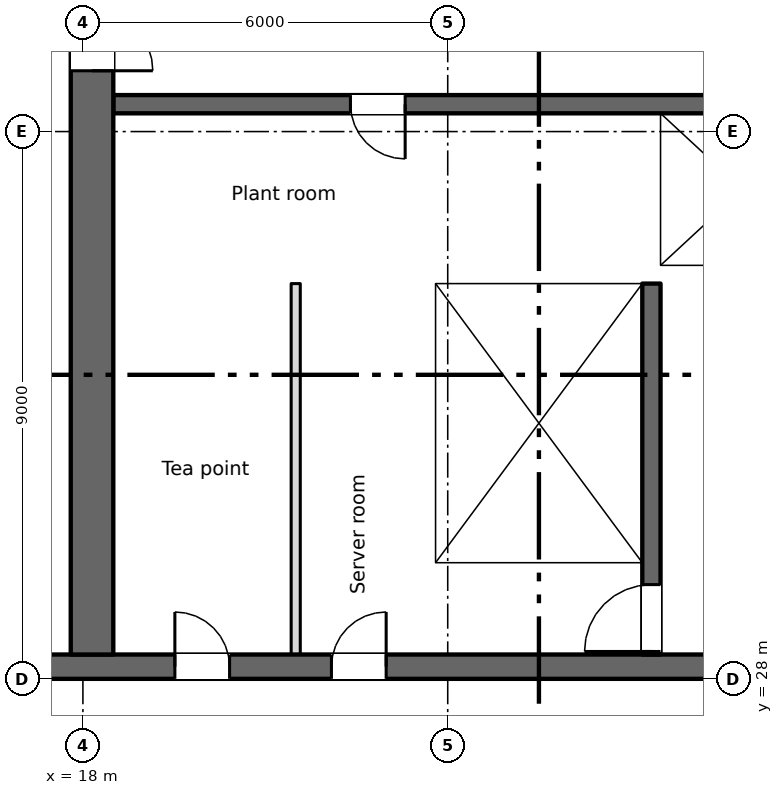
"""IFC4 building model, lengths in metres.
Left out: names, types, materials, properties, quantities, classifications, styles, units other than length and angle.
Written with IfcOpenShell. Run it as: python <this file> out.ifc"""

import sys

from ifc_helpers import new_model, si_unit, direction, frame, frame_2d, origin, place, context, subcontext, project, spatial, rectangle, extrude, element, fill, save


model = new_model("IFC4")
c1 = context("Model", 3, precision=1e-05, world=origin(), true_north=direction((0.0, 1.0)))
c2 = subcontext(c1, "Body", "Model", "MODEL_VIEW")
j1 = project(units=[si_unit("LENGTHUNIT", "METRE"), si_unit("PLANEANGLEUNIT", "RADIAN")], contexts=[c1])
p1 = place(None, origin())
s1 = spatial("IfcSite", under=j1, at=p1, CompositionType="ELEMENT")
p2 = place(p1, origin())
s2 = spatial("IfcBuilding", under=s1, at=p2, CompositionType="ELEMENT")
p3 = place(p2, frame((0.0, 0.0, 189.25)))
s3 = spatial("IfcBuildingStorey", under=s2, at=p3, CompositionType="ELEMENT", Elevation=189.25)
p4 = place(p3, frame((6.6, 28.2, 0.0), z_axis=(0.0, 0.0, 1.0), x_axis=(1.0, 0.0, 0.0)))
e1 = element("IfcWall", 1, at=p4, inside=s3, PredefinedType="SHEAR", context=c2, shape_type="SweptSolid", body=[
    extrude(rectangle(XDim=57.9, YDim=0.4, at=frame_2d((28.95, 0.0))), origin(), (0.0, 0.0, 1.0), 3.35),
])
p5 = place(p4, frame((12.913, 0.0, 0.0)))
e2 = element("IfcOpeningElement", 2, at=p5, cuts=e1, PredefinedType="OPENING", context=c2, shape_type="SweptSolid", body=[
    extrude(rectangle(XDim=0.9, YDim=2.1, at=frame_2d((0.45, 1.05))), frame((0.0, 0.21, 0.0), z_axis=(0.0, -1.0, 0.0), x_axis=(1.0, 0.0, 0.0)), (0.0, 0.0, 1.0), 0.42),
])
p6 = place(p4, frame((15.488, 0.0, 0.0)))
e3 = element("IfcOpeningElement", 3, at=p6, cuts=e1, PredefinedType="OPENING", context=c2, shape_type="SweptSolid", body=[
    extrude(rectangle(XDim=0.9, YDim=2.1, at=frame_2d((0.45, 1.05))), frame((0.0, 0.21, 0.0), z_axis=(0.0, -1.0, 0.0), x_axis=(1.0, 0.0, 0.0)), (0.0, 0.0, 1.0), 0.42),
])
p7 = place(p4, frame((48.413, 0.0, 0.0)))
e4 = element("IfcOpeningElement", 4, at=p7, cuts=e1, PredefinedType="OPENING", context=c2, shape_type="SweptSolid", body=[
    extrude(rectangle(XDim=0.9, YDim=2.1, at=frame_2d((0.45, 1.05))), frame((0.0, 0.21, 0.0), z_axis=(0.0, -1.0, 0.0), x_axis=(1.0, 0.0, 0.0)), (0.0, 0.0, 1.0), 0.42),
])
p8 = place(p4, frame((50.988, 0.0, 0.0)))
e5 = element("IfcOpeningElement", 5, at=p8, cuts=e1, PredefinedType="OPENING", context=c2, shape_type="SweptSolid", body=[
    extrude(rectangle(XDim=0.9, YDim=2.1, at=frame_2d((0.45, 1.05))), frame((0.0, 0.21, 0.0), z_axis=(0.0, -1.0, 0.0), x_axis=(1.0, 0.0, 0.0)), (0.0, 0.0, 1.0), 0.42),
])
p9 = place(p4, frame((0.663, 0.0, 0.0)))
e6 = element("IfcOpeningElement", 6, at=p9, cuts=e1, PredefinedType="OPENING", context=c2, shape_type="SweptSolid", body=[
    extrude(rectangle(XDim=0.9, YDim=2.1, at=frame_2d((0.45, 1.05))), frame((0.0, 0.21, 0.0), z_axis=(0.0, -1.0, 0.0), x_axis=(1.0, 0.0, 0.0)), (0.0, 0.0, 1.0), 0.42),
])
p10 = place(p4, frame((2.238, 0.0, 0.0)))
e7 = element("IfcOpeningElement", 7, at=p10, cuts=e1, PredefinedType="OPENING", context=c2, shape_type="SweptSolid", body=[
    extrude(rectangle(XDim=0.9, YDim=2.1, at=frame_2d((0.45, 1.05))), frame((0.0, 0.21, 0.0), z_axis=(0.0, -1.0, 0.0), x_axis=(1.0, 0.0, 0.0)), (0.0, 0.0, 1.0), 0.42),
])
p11 = place(p4, frame((4.8, 0.0, 0.0)))
e8 = element("IfcOpeningElement", 8, at=p11, cuts=e1, PredefinedType="OPENING", context=c2, shape_type="SweptSolid", body=[
    extrude(rectangle(XDim=1.2, YDim=2.1, at=frame_2d((0.6, 1.05))), frame((0.0, 0.21, 0.0), z_axis=(0.0, -1.0, 0.0), x_axis=(1.0, 0.0, 0.0)), (0.0, 0.0, 1.0), 0.42),
])
p12 = place(p4, frame((31.8, 0.0, 0.0)))
e9 = element("IfcOpeningElement", 9, at=p12, cuts=e1, PredefinedType="OPENING", context=c2, shape_type="SweptSolid", body=[
    extrude(rectangle(XDim=1.2, YDim=2.1, at=frame_2d((0.6, 1.05))), frame((0.0, 0.21, 0.0), z_axis=(0.0, -1.0, 0.0), x_axis=(1.0, 0.0, 0.0)), (0.0, 0.0, 1.0), 0.42),
])
p13 = place(p4, frame((55.3, 0.0, 0.0)))
e10 = element("IfcOpeningElement", 10, at=p13, cuts=e1, PredefinedType="OPENING", context=c2, shape_type="SweptSolid", body=[
    extrude(rectangle(XDim=1.2, YDim=2.1, at=frame_2d((0.6, 1.05))), frame((0.0, 0.21, 0.0), z_axis=(0.0, -1.0, 0.0), x_axis=(1.0, 0.0, 0.0)), (0.0, 0.0, 1.0), 0.42),
])
p14 = place(p4, frame((21.8, 0.0, 0.0)))
e11 = element("IfcOpeningElement", 11, at=p14, cuts=e1, PredefinedType="OPENING", context=c2, shape_type="SweptSolid", body=[
    extrude(rectangle(XDim=1.2, YDim=2.1, at=frame_2d((0.6, 1.05))), frame((0.0, 0.21, 0.0), z_axis=(0.0, -1.0, 0.0), x_axis=(1.0, 0.0, 0.0)), (0.0, 0.0, 1.0), 0.42),
])
p15 = place(p4, frame((41.8, 0.0, 0.0)))
e12 = element("IfcOpeningElement", 12, at=p15, cuts=e1, PredefinedType="OPENING", context=c2, shape_type="SweptSolid", body=[
    extrude(rectangle(XDim=1.2, YDim=2.1, at=frame_2d((0.6, 1.05))), frame((0.0, 0.21, 0.0), z_axis=(0.0, -1.0, 0.0), x_axis=(1.0, 0.0, 0.0)), (0.0, 0.0, 1.0), 0.42),
])
p16 = place(p4, frame((24.95, 0.0, 0.0)))
e13 = element("IfcOpeningElement", 13, at=p16, cuts=e1, PredefinedType="OPENING", context=c2, shape_type="SweptSolid", body=[
    extrude(rectangle(XDim=2.4, YDim=2.1, at=frame_2d((1.2, 1.05))), frame((0.0, 0.21, 0.0), z_axis=(0.0, -1.0, 0.0), x_axis=(1.0, 0.0, 0.0)), (0.0, 0.0, 1.0), 0.42),
])
p17 = place(p4, frame((37.45, 0.0, 0.0)))
e14 = element("IfcOpeningElement", 14, at=p17, cuts=e1, PredefinedType="OPENING", context=c2, shape_type="SweptSolid", body=[
    extrude(rectangle(XDim=2.4, YDim=2.1, at=frame_2d((1.2, 1.05))), frame((0.0, 0.21, 0.0), z_axis=(0.0, -1.0, 0.0), x_axis=(1.0, 0.0, 0.0)), (0.0, 0.0, 1.0), 0.42),
])
p18 = place(p4, frame((8.1, 0.0, 0.0)))
e15 = element("IfcOpeningElement", 15, at=p18, cuts=e1, PredefinedType="OPENING", context=c2, shape_type="SweptSolid", body=[
    extrude(rectangle(XDim=2.4, YDim=2.1, at=frame_2d((1.2, 1.05))), frame((0.0, 0.21, 0.0), z_axis=(0.0, -1.0, 0.0), x_axis=(1.0, 0.0, 0.0)), (0.0, 0.0, 1.0), 0.42),
])
p19 = place(p4, frame((28.95, 0.0, 0.0)))
e16 = element("IfcOpeningElement", 16, at=p19, cuts=e1, PredefinedType="OPENING", context=c2, shape_type="SweptSolid", body=[
    extrude(rectangle(XDim=0.9, YDim=2.1, at=frame_2d((0.45, 1.05))), frame((0.0, 0.21, 0.0), z_axis=(0.0, -1.0, 0.0), x_axis=(1.0, 0.0, 0.0)), (0.0, 0.0, 1.0), 0.42),
])
p20 = place(p4, frame((34.95, 0.0, 0.0)))
e17 = element("IfcOpeningElement", 17, at=p20, cuts=e1, PredefinedType="OPENING", context=c2, shape_type="SweptSolid", body=[
    extrude(rectangle(XDim=0.9, YDim=2.1, at=frame_2d((0.45, 1.05))), frame((0.0, 0.21, 0.0), z_axis=(0.0, -1.0, 0.0), x_axis=(1.0, 0.0, 0.0)), (0.0, 0.0, 1.0), 0.42),
])
p21 = place(p3, frame((18.15, 28.4, 0.0), z_axis=(0.0, 0.0, 1.0), x_axis=(0.0, 1.0, 0.0)))
e18 = element("IfcWall", 18, at=p21, inside=s3, PredefinedType="SHEAR", context=c2, shape_type="SweptSolid", body=[
    extrude(rectangle(XDim=16.9, YDim=0.7, at=frame_2d((8.45, 0.0))), origin(), (0.0, 0.0, 1.0), 3.35),
])
p22 = place(p21, frame((9.6, 0.0, 0.0)))
e19 = element("IfcOpeningElement", 19, at=p22, cuts=e18, PredefinedType="OPENING", context=c2, shape_type="SweptSolid", body=[
    extrude(rectangle(XDim=2.0, YDim=2.1, at=frame_2d((1.0, 1.05))), frame((0.0, 0.36, 0.0), z_axis=(0.0, -1.0, 0.0), x_axis=(1.0, 0.0, 0.0)), (0.0, 0.0, 1.0), 0.72),
])
p23 = place(p21, frame((15.4, 0.0, 0.0)))
e20 = element("IfcOpeningElement", 20, at=p23, cuts=e18, PredefinedType="OPENING", context=c2, shape_type="SweptSolid", body=[
    extrude(rectangle(XDim=1.2, YDim=2.1, at=frame_2d((0.6, 1.05))), frame((0.0, 0.36, 0.0), z_axis=(0.0, -1.0, 0.0), x_axis=(1.0, 0.0, 0.0)), (0.0, 0.0, 1.0), 0.72),
])
p24 = place(p3, frame((23.65, 28.4, 0.0), z_axis=(0.0, 0.0, 1.0), x_axis=(0.0, 1.0, 0.0)))
e21 = element("IfcWall", 21, at=p24, inside=s3, PredefinedType="SHEAR", context=c2, shape_type="SweptSolid", body=[
    extrude(rectangle(XDim=6.1, YDim=0.3, at=frame_2d((3.05, 0.0))), origin(), (0.0, 0.0, 1.0), 3.35),
])
p25 = place(p3, frame((27.35, 28.4, 0.0), z_axis=(0.0, 0.0, 1.0), x_axis=(0.0, 1.0, 0.0)))
e22 = element("IfcWall", 22, at=p25, inside=s3, PredefinedType="SHEAR", context=c2, shape_type="SweptSolid", body=[
    extrude(rectangle(XDim=6.1, YDim=0.3, at=frame_2d((3.05, 0.0))), origin(), (0.0, 0.0, 1.0), 3.35),
])
p26 = place(p25, frame((0.05, 0.0, 0.0)))
e23 = element("IfcOpeningElement", 23, at=p26, cuts=e22, PredefinedType="OPENING", context=c2, shape_type="SweptSolid", body=[
    extrude(rectangle(XDim=1.1, YDim=2.1, at=frame_2d((0.55, 1.05))), frame((0.0, 0.16, 0.0), z_axis=(0.0, -1.0, 0.0), x_axis=(1.0, 0.0, 0.0)), (0.0, 0.0, 1.0), 0.32),
])
p27 = place(p3, frame((18.5, 34.65, 0.0), z_axis=(0.0, 0.0, 1.0), x_axis=(1.0, 0.0, 0.0)))
e24 = element("IfcWall", 24, at=p27, inside=s3, PredefinedType="SHEAR", context=c2, shape_type="SweptSolid", body=[
    extrude(rectangle(XDim=12.2, YDim=0.3, at=frame_2d((6.1, 0.0))), origin(), (0.0, 0.0, 1.0), 3.35),
])
p28 = place(p27, frame((9.8, 0.0, 0.0)))
e25 = element("IfcOpeningElement", 25, at=p28, cuts=e24, PredefinedType="OPENING", context=c2, shape_type="SweptSolid", body=[
    extrude(rectangle(XDim=1.1, YDim=2.1, at=frame_2d((0.55, 1.05))), frame((0.0, 0.16, 0.0), z_axis=(0.0, -1.0, 0.0), x_axis=(1.0, 0.0, 0.0)), (0.0, 0.0, 1.0), 0.32),
])
p29 = place(p3, frame((30.7, 37.45, 0.0), z_axis=(0.0, 0.0, 1.0), x_axis=(-1.0, 0.0, 0.0)))
e26 = element("IfcWall", 26, at=p29, inside=s3, PredefinedType="SHEAR", context=c2, shape_type="SweptSolid", body=[
    extrude(rectangle(XDim=12.2, YDim=0.3, at=frame_2d((6.1, 0.0))), origin(), (0.0, 0.0, 1.0), 3.35),
])
p30 = place(p29, frame((7.4, 0.0, 0.0)))
e27 = element("IfcOpeningElement", 27, at=p30, cuts=e26, PredefinedType="OPENING", context=c2, shape_type="SweptSolid", body=[
    extrude(rectangle(XDim=0.9, YDim=2.1, at=frame_2d((0.45, 1.05))), frame((0.0, 0.16, 0.0), z_axis=(0.0, -1.0, 0.0), x_axis=(1.0, 0.0, 0.0)), (0.0, 0.0, 1.0), 0.32),
])
p31 = place(p3, frame((27.35, 34.8, 0.0), z_axis=(0.0, 0.0, 1.0), x_axis=(0.0, 1.0, 0.0)))
e28 = element("IfcWall", 28, at=p31, inside=s3, PredefinedType="SHEAR", context=c2, shape_type="SweptSolid", body=[
    extrude(rectangle(XDim=2.5, YDim=0.3, at=frame_2d((1.25, 0.0))), origin(), (0.0, 0.0, 1.0), 3.35),
])
p32 = place(p3, frame((21.5, 28.4, 0.0), z_axis=(0.0, 0.0, 1.0), x_axis=(0.0, 1.0, 0.0)))
e29 = element("IfcWall", 29, at=p32, inside=s3, PredefinedType="PARTITIONING", context=c2, shape_type="SweptSolid", body=[
    extrude(rectangle(XDim=6.1, YDim=0.15, at=frame_2d((3.05, 0.0))), origin(), (0.0, 0.0, 1.0), 3.35),
])
p33 = place(p5, origin())
e30 = element("IfcDoor", 30, at=p33, inside=s3, OperationType="SINGLE_SWING_LEFT", PredefinedType="DOOR", context=c2, shape_type="SweptSolid", body=[
    extrude(rectangle(XDim=0.9, YDim=2.1, at=frame_2d((0.45, 1.05))), frame((0.0, 0.025, 0.0), z_axis=(0.0, -1.0, 0.0), x_axis=(1.0, 0.0, 0.0)), (0.0, 0.0, 1.0), 0.05),
])
fill(e2, e30)
p34 = place(p6, origin())
e31 = element("IfcDoor", 31, at=p34, inside=s3, OperationType="SINGLE_SWING_RIGHT", PredefinedType="DOOR", context=c2, shape_type="SweptSolid", body=[
    extrude(rectangle(XDim=0.9, YDim=2.1, at=frame_2d((0.45, 1.05))), frame((0.0, 0.025, 0.0), z_axis=(0.0, -1.0, 0.0), x_axis=(1.0, 0.0, 0.0)), (0.0, 0.0, 1.0), 0.05),
])
fill(e3, e31)
p35 = place(p30, origin())
e32 = element("IfcDoor", 32, at=p35, inside=s3, OperationType="SINGLE_SWING_LEFT", PredefinedType="DOOR", context=c2, shape_type="SweptSolid", body=[
    extrude(rectangle(XDim=0.9, YDim=2.1, at=frame_2d((0.45, 1.05))), frame((0.0, 0.025, 0.0), z_axis=(0.0, -1.0, 0.0), x_axis=(1.0, 0.0, 0.0)), (0.0, 0.0, 1.0), 0.05),
])
fill(e27, e32)
p36 = place(p26, origin())
e33 = element("IfcDoor", 33, at=p36, inside=s3, OperationType="SINGLE_SWING_LEFT", PredefinedType="DOOR", context=c2, shape_type="SweptSolid", body=[
    extrude(rectangle(XDim=1.1, YDim=2.1, at=frame_2d((0.55, 1.05))), frame((0.0, 0.025, 0.0), z_axis=(0.0, -1.0, 0.0), x_axis=(1.0, 0.0, 0.0)), (0.0, 0.0, 1.0), 0.05),
])
fill(e23, e33)
p37 = place(p22, origin())
e34 = element("IfcDoor", 34, at=p37, inside=s3, OperationType="DOUBLE_DOOR_SINGLE_SWING", PredefinedType="DOOR", context=c2, shape_type="SweptSolid", body=[
    extrude(rectangle(XDim=2.0, YDim=2.1, at=frame_2d((1.0, 1.05))), frame((0.0, 0.025, 0.0), z_axis=(0.0, -1.0, 0.0), x_axis=(1.0, 0.0, 0.0)), (0.0, 0.0, 1.0), 0.05),
])
fill(e19, e34)
save(model, sys.argv[1])
